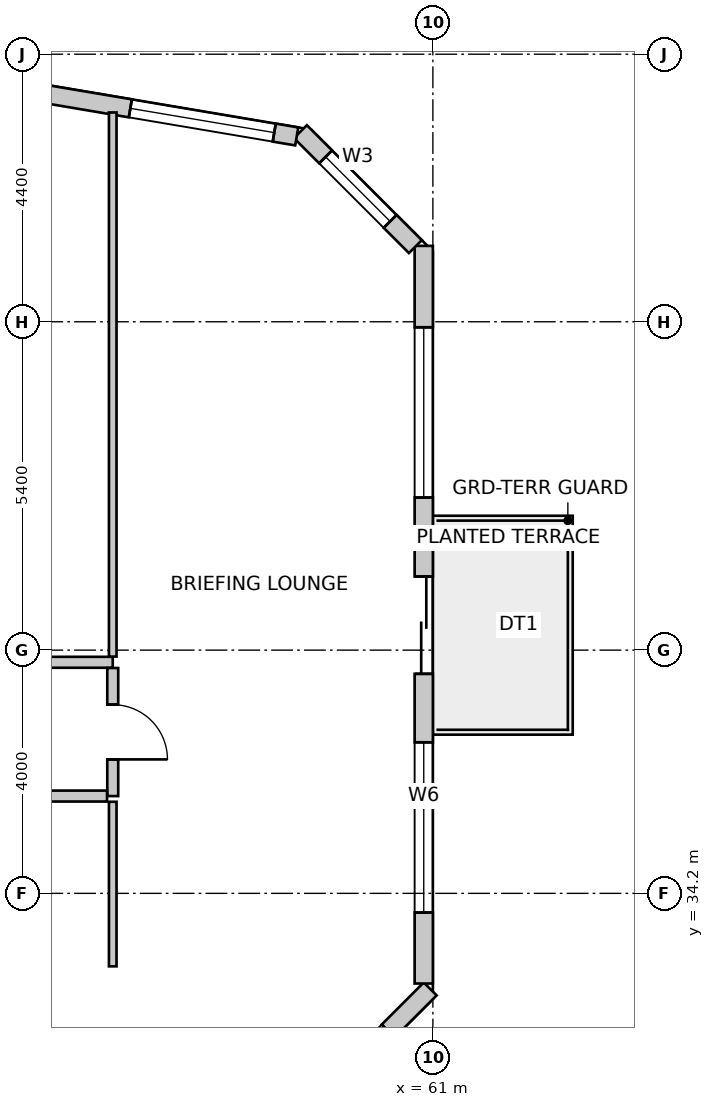
"""IFC4 building model, lengths in metres.
Left out: names, types, materials, properties, quantities, classifications, styles, units other than length and angle.
Written with IfcOpenShell. Run it as: python <this file> out.ifc"""

import sys

from ifc_helpers import new_model, si_unit, direction, frame, frame_2d, origin, place, context, subcontext, project, spatial, rectangle, extrude, source, transform, mapped, element, fill, save


model = new_model("IFC4")
c1 = context("Model", 3, precision=1e-05, world=origin(), true_north=direction((0.0, 1.0)))
c2 = subcontext(c1, "Body", "Model", "MODEL_VIEW")
j1 = project(units=[si_unit("LENGTHUNIT", "METRE"), si_unit("PLANEANGLEUNIT", "RADIAN")], contexts=[c1])
p1 = place(None, origin())
s1 = spatial("IfcSite", under=j1, at=p1, CompositionType="ELEMENT")
p2 = place(p1, origin())
s2 = spatial("IfcBuilding", under=s1, at=p2, CompositionType="ELEMENT")
p3 = place(p2, frame((0.0, 0.0, 35.0)))
s3 = spatial("IfcBuildingStorey", under=s2, at=p3, CompositionType="ELEMENT", Elevation=35.0)
p4 = place(p3, frame((57.876, 29.548, 0.0), z_axis=(0.0, 0.0, 1.0), x_axis=(0.707106781187, 0.707106781187, 0.0)))
e1 = element("IfcWall", 1, at=p4, inside=s3, PredefinedType="SOLIDWALL", context=c2, shape_type="SweptSolid", body=[
    extrude(rectangle(XDim=4.356, YDim=0.3, at=frame_2d((2.178, 0.0))), origin(), (0.0, 0.0, 1.0), 3.75),
])
m1 = source(origin(), c2, "Body", "SweptSolid", [
    extrude(rectangle(XDim=2.4, YDim=2.2, at=frame_2d((1.2, 1.1))), frame((0.0, 0.16, 0.0), z_axis=(0.0, -1.0, 0.0), x_axis=(1.0, 0.0, 0.0)), (0.0, 0.0, 1.0), 0.32),
])
p5 = place(p4, frame((0.978, 0.0, 0.85)))
e2 = element("IfcOpeningElement", 2, at=p5, cuts=e1, PredefinedType="OPENING", context=c2, shape_type="MappedRepresentation", body=[
    mapped(m1, transform((0.0, 0.0, 0.0), scale=1.0)),
])
p6 = place(p3, frame((60.85, 32.717, 0.0), z_axis=(0.0, 0.0, 1.0), x_axis=(0.0, 1.0, 0.0)))
e3 = element("IfcWall", 3, at=p6, inside=s3, PredefinedType="SOLIDWALL", context=c2, shape_type="SweptSolid", body=[
    extrude(rectangle(XDim=12.131, YDim=0.3, at=frame_2d((6.065, 0.0))), origin(), (0.0, 0.0, 1.0), 3.75),
])
m2 = source(origin(), c2, "Body", "SweptSolid", [
    extrude(rectangle(XDim=1.6, YDim=2.15, at=frame_2d((0.8, 1.075))), frame((0.0, 0.16, 0.0), z_axis=(0.0, -1.0, 0.0), x_axis=(1.0, 0.0, 0.0)), (0.0, 0.0, 1.0), 0.32),
])
p7 = place(p6, frame((5.093, 0.0, 0.0)))
e4 = element("IfcOpeningElement", 4, at=p7, cuts=e3, PredefinedType="OPENING", context=c2, shape_type="MappedRepresentation", body=[
    mapped(m2, transform((0.0, 0.0, 0.0), scale=1.0)),
])
m3 = source(origin(), c2, "Body", "SweptSolid", [
    extrude(rectangle(XDim=2.8, YDim=2.4, at=frame_2d((1.4, 1.2))), frame((0.0, 0.16, 0.0), z_axis=(0.0, -1.0, 0.0), x_axis=(1.0, 0.0, 0.0)), (0.0, 0.0, 1.0), 0.32),
])
p8 = place(p6, frame((1.167, 0.0, 0.85)))
e5 = element("IfcOpeningElement", 5, at=p8, cuts=e3, PredefinedType="OPENING", context=c2, shape_type="MappedRepresentation", body=[
    mapped(m3, transform((0.0, 0.0, 0.0), scale=1.0)),
])
p9 = place(p6, frame((7.992, 0.0, 0.85)))
e6 = element("IfcOpeningElement", 6, at=p9, cuts=e3, PredefinedType="OPENING", context=c2, shape_type="MappedRepresentation", body=[
    mapped(m3, transform((0.0, 0.0, 0.0), scale=1.0)),
])
p10 = place(p3, frame((60.712, 44.836, 0.0), z_axis=(0.0, 0.0, 1.0), x_axis=(-0.707106781187, 0.707106781187, 0.0)))
e7 = element("IfcWall", 7, at=p10, inside=s3, PredefinedType="SOLIDWALL", context=c2, shape_type="SweptSolid", body=[
    extrude(rectangle(XDim=2.673, YDim=0.3, at=frame_2d((1.336, 0.0))), origin(), (0.0, 0.0, 1.0), 3.75),
])
m4 = source(origin(), c2, "Body", "SweptSolid", [
    extrude(rectangle(XDim=1.5, YDim=1.8, at=frame_2d((0.75, 0.9))), frame((0.0, 0.16, 0.0), z_axis=(0.0, -1.0, 0.0), x_axis=(1.0, 0.0, 0.0)), (0.0, 0.0, 1.0), 0.32),
])
p11 = place(p10, frame((0.587, 0.0, 0.85)))
e8 = element("IfcOpeningElement", 8, at=p11, cuts=e7, PredefinedType="OPENING", context=c2, shape_type="MappedRepresentation", body=[
    mapped(m4, transform((0.0, 0.0, 0.0), scale=1.0)),
])
p12 = place(p3, frame((58.761, 46.648, 0.0), z_axis=(0.0, 0.0, 1.0), x_axis=(-0.98607502735, 0.166301053624, 0.0)))
e9 = element("IfcWall", 9, at=p12, inside=s3, PredefinedType="SOLIDWALL", context=c2, shape_type="SweptSolid", body=[
    extrude(rectangle(XDim=37.397, YDim=0.3, at=frame_2d((18.699, 0.0))), origin(), (0.0, 0.0, 1.0), 3.75),
])
p13 = place(p12, frame((0.375, 0.0, 0.85)))
e10 = element("IfcOpeningElement", 10, at=p13, cuts=e9, PredefinedType="OPENING", context=c2, shape_type="MappedRepresentation", body=[
    mapped(m1, transform((0.0, 0.0, 0.0), scale=1.0)),
])
p14 = place(p12, frame((4.54, 0.0, 0.85)))
e11 = element("IfcOpeningElement", 11, at=p14, cuts=e9, PredefinedType="OPENING", context=c2, shape_type="MappedRepresentation", body=[
    mapped(m3, transform((0.0, 0.0, 0.0), scale=1.0)),
])
p15 = place(p12, frame((10.081, 0.0, 0.85)))
e12 = element("IfcOpeningElement", 12, at=p15, cuts=e9, PredefinedType="OPENING", context=c2, shape_type="MappedRepresentation", body=[
    mapped(m1, transform((0.0, 0.0, 0.0), scale=1.0)),
])
p16 = place(p12, frame((15.273, 0.0, 0.85)))
e13 = element("IfcOpeningElement", 13, at=p16, cuts=e9, PredefinedType="OPENING", context=c2, shape_type="MappedRepresentation", body=[
    mapped(m3, transform((0.0, 0.0, 0.0), scale=1.0)),
])
p17 = place(p12, frame((20.036, 0.0, 0.85)))
e14 = element("IfcOpeningElement", 14, at=p17, cuts=e9, PredefinedType="OPENING", context=c2, shape_type="MappedRepresentation", body=[
    mapped(m1, transform((0.0, 0.0, 0.0), scale=1.0)),
])
p18 = place(p12, frame((24.398, 0.0, 0.85)))
e15 = element("IfcOpeningElement", 15, at=p18, cuts=e9, PredefinedType="OPENING", context=c2, shape_type="MappedRepresentation", body=[
    mapped(m3, transform((0.0, 0.0, 0.0), scale=1.0)),
])
p19 = place(p12, frame((29.757, 0.0, 0.85)))
e16 = element("IfcOpeningElement", 16, at=p19, cuts=e9, PredefinedType="OPENING", context=c2, shape_type="MappedRepresentation", body=[
    mapped(m3, transform((0.0, 0.0, 0.0), scale=1.0)),
])
p20 = place(p12, frame((34.256, 0.0, 0.85)))
e17 = element("IfcOpeningElement", 17, at=p20, cuts=e9, PredefinedType="OPENING", context=c2, shape_type="MappedRepresentation", body=[
    mapped(m3, transform((0.0, 0.0, 0.0), scale=1.0)),
])
p21 = place(p3, frame((44.929, 38.0, 0.0), z_axis=(0.0, 0.0, 1.0), x_axis=(1.0, 0.0, 0.0)))
e18 = element("IfcWall", 18, at=p21, inside=s3, PredefinedType="PARTITIONING", context=c2, shape_type="SweptSolid", body=[
    extrude(rectangle(XDim=10.806, YDim=0.18, at=frame_2d((5.403, 0.0))), origin(), (0.0, 0.0, 1.0), 3.125),
])
m5 = source(origin(), c2, "Body", "SweptSolid", [
    extrude(rectangle(XDim=0.9, YDim=2.15, at=frame_2d((0.45, 1.075))), frame((0.0, 0.1, 0.0), z_axis=(0.0, -1.0, 0.0), x_axis=(1.0, 0.0, 0.0)), (0.0, 0.0, 1.0), 0.2),
])
p22 = place(p21, frame((4.892, 0.0, 0.0)))
e19 = element("IfcOpeningElement", 19, at=p22, cuts=e18, PredefinedType="OPENING", context=c2, shape_type="MappedRepresentation", body=[
    mapped(m5, transform((0.0, 0.0, 0.0), scale=1.0)),
])
p23 = place(p3, frame((55.735, 37.906, 0.0), z_axis=(0.0, 0.0, 1.0), x_axis=(0.0, -1.0, 0.0)))
e20 = element("IfcWall", 20, at=p23, inside=s3, PredefinedType="PARTITIONING", context=c2, shape_type="SweptSolid", body=[
    extrude(rectangle(XDim=2.106, YDim=0.18, at=frame_2d((1.053, 0.0))), origin(), (0.0, 0.0, 1.0), 3.75),
])
p24 = place(p23, frame((0.603, 0.0, 0.0)))
e21 = element("IfcOpeningElement", 21, at=p24, cuts=e20, PredefinedType="OPENING", context=c2, shape_type="MappedRepresentation", body=[
    mapped(m5, transform((0.0, 0.0, 0.0), scale=1.0)),
])
p25 = place(p3, frame((55.641, 35.8, 0.0), z_axis=(0.0, 0.0, 1.0), x_axis=(-1.0, 0.0, 0.0)))
e22 = element("IfcWall", 22, at=p25, inside=s3, PredefinedType="PARTITIONING", context=c2, shape_type="SweptSolid", body=[
    extrude(rectangle(XDim=21.841, YDim=0.18, at=frame_2d((10.92, 0.0))), origin(), (0.0, 0.0, 1.0), 3.125),
])
p26 = place(p25, frame((10.531, 0.0, 0.0)))
e23 = element("IfcOpeningElement", 23, at=p26, cuts=e22, PredefinedType="OPENING", context=c2, shape_type="MappedRepresentation", body=[
    mapped(m5, transform((0.0, 0.0, 0.0), scale=1.0)),
])
p27 = place(p3, frame((55.735, 47.042, 0.0), z_axis=(0.0, 0.0, 1.0), x_axis=(0.0, -1.0, 0.0)))
e24 = element("IfcWall", 24, at=p27, inside=s3, PredefinedType="PARTITIONING", context=c2, shape_type="SweptSolid", body=[
    extrude(rectangle(XDim=8.948, YDim=0.125, at=frame_2d((4.474, 0.0))), origin(), (0.0, 0.0, 1.0), 3.75),
])
p28 = place(p3, frame((55.735, 33.0, 0.0), z_axis=(0.0, 0.0, 1.0), x_axis=(0.0, 1.0, 0.0)))
e25 = element("IfcWall", 25, at=p28, inside=s3, PredefinedType="PARTITIONING", context=c2, shape_type="SweptSolid", body=[
    extrude(rectangle(XDim=2.706, YDim=0.125, at=frame_2d((1.353, 0.0))), origin(), (0.0, 0.0, 1.0), 3.75),
])
m6 = source(origin(), c2, "Body", "SweptSolid", [
    extrude(rectangle(XDim=1.6, YDim=2.15, at=frame_2d((0.8, 1.075))), frame((0.0, 0.025, 0.0), z_axis=(0.0, -1.0, 0.0), x_axis=(1.0, 0.0, 0.0)), (0.0, 0.0, 1.0), 0.05),
])
p29 = place(p7, origin())
e26 = element("IfcDoor", 26, at=p29, inside=s3, OperationType="DOUBLE_DOOR_SLIDING", PredefinedType="DOOR", context=c2, shape_type="MappedRepresentation", body=[
    mapped(m6, transform((0.0, 0.0, 0.0), scale=1.0)),
])
fill(e4, e26)
m7 = source(origin(), c2, "Body", "SweptSolid", [
    extrude(rectangle(XDim=2.8, YDim=2.4, at=frame_2d((1.4, 1.2))), frame((0.0, -0.015, 0.0), z_axis=(0.0, -1.0, 0.0), x_axis=(1.0, 0.0, 0.0)), (0.0, 0.0, 1.0), 0.06),
])
p30 = place(p8, origin())
e27 = element("IfcWindow", 27, at=p30, inside=s3, PartitioningType="SINGLE_PANEL", PredefinedType="WINDOW", context=c2, shape_type="MappedRepresentation", body=[
    mapped(m7, transform((0.0, 0.0, 0.0), scale=1.0)),
])
fill(e5, e27)
p31 = place(p9, origin())
e28 = element("IfcWindow", 28, at=p31, inside=s3, PartitioningType="SINGLE_PANEL", PredefinedType="WINDOW", context=c2, shape_type="MappedRepresentation", body=[
    mapped(m7, transform((0.0, 0.0, 0.0), scale=1.0)),
])
fill(e6, e28)
m8 = source(origin(), c2, "Body", "SweptSolid", [
    extrude(rectangle(XDim=1.5, YDim=1.8, at=frame_2d((0.75, 0.9))), frame((0.0, -0.015, 0.0), z_axis=(0.0, -1.0, 0.0), x_axis=(1.0, 0.0, 0.0)), (0.0, 0.0, 1.0), 0.06),
])
p32 = place(p11, origin())
e29 = element("IfcWindow", 29, at=p32, inside=s3, PartitioningType="SINGLE_PANEL", PredefinedType="WINDOW", context=c2, shape_type="MappedRepresentation", body=[
    mapped(m8, transform((0.0, 0.0, 0.0), scale=1.0)),
])
fill(e8, e29)
m9 = source(origin(), c2, "Body", "SweptSolid", [
    extrude(rectangle(XDim=2.4, YDim=2.2, at=frame_2d((1.2, 1.1))), frame((0.0, -0.015, 0.0), z_axis=(0.0, -1.0, 0.0), x_axis=(1.0, 0.0, 0.0)), (0.0, 0.0, 1.0), 0.06),
])
p33 = place(p13, origin())
e30 = element("IfcWindow", 30, at=p33, inside=s3, PartitioningType="SINGLE_PANEL", PredefinedType="WINDOW", context=c2, shape_type="MappedRepresentation", body=[
    mapped(m9, transform((0.0, 0.0, 0.0), scale=1.0)),
])
fill(e10, e30)
m10 = source(origin(), c2, "Body", "SweptSolid", [
    extrude(rectangle(XDim=0.9, YDim=2.15, at=frame_2d((0.45, 1.075))), frame((0.0, 0.025, 0.0), z_axis=(0.0, -1.0, 0.0), x_axis=(1.0, 0.0, 0.0)), (0.0, 0.0, 1.0), 0.05),
])
p34 = place(p24, origin())
e31 = element("IfcDoor", 31, at=p34, inside=s3, OperationType="SINGLE_SWING_RIGHT", PredefinedType="DOOR", context=c2, shape_type="MappedRepresentation", body=[
    mapped(m10, transform((0.0, 0.0, 0.0), scale=1.0)),
])
fill(e21, e31)
save(model, sys.argv[1])
